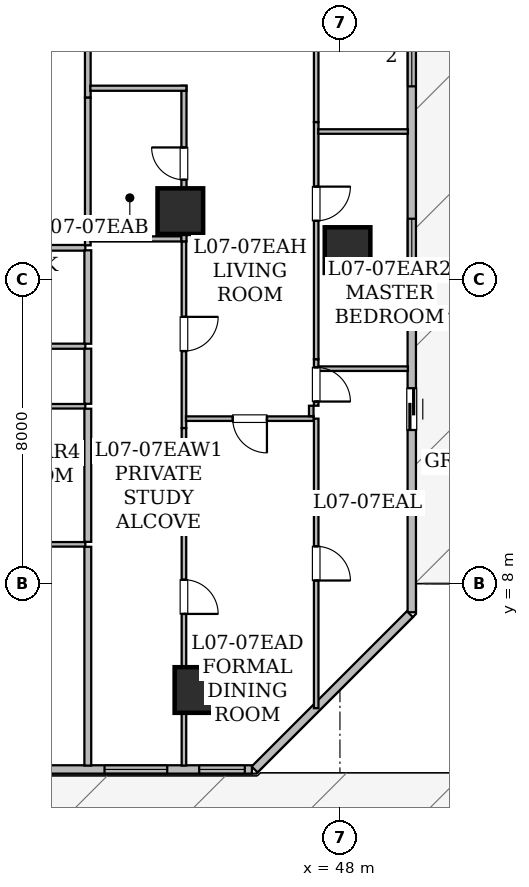
"""IFC4 building model, lengths in metres.
Left out: names, types, materials, properties, quantities, classifications, styles, units other than length and angle.
Written with IfcOpenShell. Run it as: python <this file> out.ifc"""

import sys

from ifc_helpers import new_model, si_unit, direction, frame, frame_2d, origin, origin_2d, place, context, subcontext, project, spatial, rectangle, hollow_rectangle, extrude, element, fill, save


model = new_model("IFC4")
c1 = context("Model", 3, precision=1e-05, world=origin(), true_north=direction((0.0, 1.0)))
c2 = subcontext(c1, "Body", "Model", "MODEL_VIEW")
j1 = project(units=[si_unit("LENGTHUNIT", "METRE"), si_unit("PLANEANGLEUNIT", "RADIAN")], contexts=[c1])
p1 = place(None, origin())
s1 = spatial("IfcSite", under=j1, at=p1, CompositionType="ELEMENT")
p2 = place(p1, origin())
s2 = spatial("IfcBuilding", under=s1, at=p2, CompositionType="ELEMENT")
p3 = place(p2, frame((0.0, 0.0, 33.3)))
s3 = spatial("IfcBuildingStorey", under=s2, at=p3, CompositionType="ELEMENT", Elevation=33.3)
for number, where, z_axis, x_axis in (
    (1, (44.25, 5.2, 0.025), (0.0, 0.0, 1.0), (1.0, 0.0, 0.0)),
    (2, (48.2, 16.775, 0.025), (0.0, 0.0, 1.0), (1.0, 0.0, 0.0)),
    (3, (43.8, 17.8, 0.025), (0.0, 0.0, 1.0), (1.0, 0.0, 0.0)),
):
    element("IfcColumn", number, at=place(p3, frame(where, z_axis=z_axis, x_axis=x_axis)), inside=s3, PredefinedType="COLUMN", context=c2, shape_type="SweptSolid", body=[
        extrude(hollow_rectangle(XDim=1.2, YDim=1.2, WallThickness=0.06, at=origin_2d()), origin(), (0.0, 0.0, 1.0), 3.625),
    ])
p4 = place(p3, frame((49.89, 24.707, 0.0), z_axis=(0.0, 0.0, 1.0), x_axis=(0.0, -1.0, 0.0)))
e4 = element("IfcWall", 4, at=p4, inside=s3, PredefinedType="STANDARD", context=c2, shape_type="SweptSolid", body=[
    extrude(rectangle(XDim=17.461, YDim=0.22, at=frame_2d((8.73, 0.0))), origin(), (0.0, 0.0, 1.0), 3.43),
])
p5 = place(p4, frame((11.566, 0.0, 0.0)))
e5 = element("IfcOpeningElement", 5, at=p5, cuts=e4, PredefinedType="OPENING", context=c2, shape_type="SweptSolid", body=[
    extrude(rectangle(XDim=1.1, YDim=2.2, at=frame_2d((0.55, 1.1))), frame((0.0, 0.12, 0.0), z_axis=(0.0, -1.0, 0.0), x_axis=(1.0, 0.0, 0.0)), (0.0, 0.0, 1.0), 0.24),
])
p6 = place(p4, frame((7.107, 0.0, 0.85)))
e6 = element("IfcOpeningElement", 6, at=p6, cuts=e4, PredefinedType="OPENING", context=c2, shape_type="SweptSolid", body=[
    extrude(rectangle(XDim=1.65, YDim=1.55, at=frame_2d((0.825, 0.775))), frame((0.0, 0.12, 0.0), z_axis=(0.0, -1.0, 0.0), x_axis=(1.0, 0.0, 0.0)), (0.0, 0.0, 1.0), 0.24),
])
p7 = place(p4, frame((1.973, 0.0, 0.85)))
e7 = element("IfcOpeningElement", 7, at=p7, cuts=e4, PredefinedType="OPENING", context=c2, shape_type="SweptSolid", body=[
    extrude(rectangle(XDim=1.65, YDim=1.55, at=frame_2d((0.825, 0.775))), frame((0.0, 0.12, 0.0), z_axis=(0.0, -1.0, 0.0), x_axis=(1.0, 0.0, 0.0)), (0.0, 0.0, 1.0), 0.24),
])
p8 = place(p3, frame((49.84, 7.196, 0.0), z_axis=(0.0, 0.0, 1.0), x_axis=(-0.707127905562, -0.70708565618, 0.0)))
e8 = element("IfcWall", 8, at=p8, inside=s3, PredefinedType="STANDARD", context=c2, shape_type="SweptSolid", body=[
    extrude(rectangle(XDim=5.779, YDim=0.22, at=frame_2d((2.889, 0.0))), origin(), (0.0, 0.0, 1.0), 3.43),
])
p9 = place(p3, frame((45.683, 3.11, 0.0), z_axis=(0.0, 0.0, 1.0), x_axis=(-1.0, 0.0, 0.0)))
e9 = element("IfcWall", 9, at=p9, inside=s3, PredefinedType="STANDARD", context=c2, shape_type="SweptSolid", body=[
    extrude(rectangle(XDim=37.368, YDim=0.22, at=frame_2d((18.684, 0.0))), origin(), (0.0, 0.0, 1.0), 3.43),
])
p10 = place(p9, frame((5.728, 0.0, 0.0)))
e10 = element("IfcOpeningElement", 10, at=p10, cuts=e9, PredefinedType="OPENING", context=c2, shape_type="SweptSolid", body=[
    extrude(rectangle(XDim=1.0, YDim=2.15, at=frame_2d((0.5, 1.075))), frame((0.0, 0.12, 0.0), z_axis=(0.0, -1.0, 0.0), x_axis=(1.0, 0.0, 0.0)), (0.0, 0.0, 1.0), 0.24),
])
p11 = place(p9, frame((31.194, 0.0, 0.85)))
e11 = element("IfcOpeningElement", 11, at=p11, cuts=e9, PredefinedType="OPENING", context=c2, shape_type="SweptSolid", body=[
    extrude(rectangle(XDim=1.65, YDim=1.55, at=frame_2d((0.825, 0.775))), frame((0.0, 0.12, 0.0), z_axis=(0.0, -1.0, 0.0), x_axis=(1.0, 0.0, 0.0)), (0.0, 0.0, 1.0), 0.24),
])
p12 = place(p9, frame((23.492, 0.0, 0.8)))
e12 = element("IfcOpeningElement", 12, at=p12, cuts=e9, PredefinedType="OPENING", context=c2, shape_type="SweptSolid", body=[
    extrude(rectangle(XDim=1.2, YDim=1.5, at=frame_2d((0.6, 0.75))), frame((0.0, 0.12, 0.0), z_axis=(0.0, -1.0, 0.0), x_axis=(1.0, 0.0, 0.0)), (0.0, 0.0, 1.0), 0.24),
])
p13 = place(p9, frame((26.282, 0.0, 0.85)))
e13 = element("IfcOpeningElement", 13, at=p13, cuts=e9, PredefinedType="OPENING", context=c2, shape_type="SweptSolid", body=[
    extrude(rectangle(XDim=1.65, YDim=1.55, at=frame_2d((0.825, 0.775))), frame((0.0, 0.12, 0.0), z_axis=(0.0, -1.0, 0.0), x_axis=(1.0, 0.0, 0.0)), (0.0, 0.0, 1.0), 0.24),
])
p14 = place(p9, frame((20.253, 0.0, 0.85)))
e14 = element("IfcOpeningElement", 14, at=p14, cuts=e9, PredefinedType="OPENING", context=c2, shape_type="SweptSolid", body=[
    extrude(rectangle(XDim=1.65, YDim=1.55, at=frame_2d((0.825, 0.775))), frame((0.0, 0.12, 0.0), z_axis=(0.0, -1.0, 0.0), x_axis=(1.0, 0.0, 0.0)), (0.0, 0.0, 1.0), 0.24),
])
p15 = place(p9, frame((10.983, 0.0, 0.8)))
e15 = element("IfcOpeningElement", 15, at=p15, cuts=e9, PredefinedType="OPENING", context=c2, shape_type="SweptSolid", body=[
    extrude(rectangle(XDim=1.2, YDim=1.5, at=frame_2d((0.6, 0.75))), frame((0.0, 0.12, 0.0), z_axis=(0.0, -1.0, 0.0), x_axis=(1.0, 0.0, 0.0)), (0.0, 0.0, 1.0), 0.24),
])
p16 = place(p9, frame((14.783, 0.0, 0.85)))
e16 = element("IfcOpeningElement", 16, at=p16, cuts=e9, PredefinedType="OPENING", context=c2, shape_type="SweptSolid", body=[
    extrude(rectangle(XDim=1.65, YDim=1.55, at=frame_2d((0.825, 0.775))), frame((0.0, 0.12, 0.0), z_axis=(0.0, -1.0, 0.0), x_axis=(1.0, 0.0, 0.0)), (0.0, 0.0, 1.0), 0.24),
])
p17 = place(p9, frame((2.228, 0.0, 0.85)))
e17 = element("IfcOpeningElement", 17, at=p17, cuts=e9, PredefinedType="OPENING", context=c2, shape_type="SweptSolid", body=[
    extrude(rectangle(XDim=1.65, YDim=1.55, at=frame_2d((0.825, 0.775))), frame((0.0, 0.12, 0.0), z_axis=(0.0, -1.0, 0.0), x_axis=(1.0, 0.0, 0.0)), (0.0, 0.0, 1.0), 0.24),
])
p18 = place(p9, frame((0.187, 0.0, 0.8)))
e18 = element("IfcOpeningElement", 18, at=p18, cuts=e9, PredefinedType="OPENING", context=c2, shape_type="SweptSolid", body=[
    extrude(rectangle(XDim=1.2, YDim=1.5, at=frame_2d((0.6, 0.75))), frame((0.0, 0.12, 0.0), z_axis=(0.0, -1.0, 0.0), x_axis=(1.0, 0.0, 0.0)), (0.0, 0.0, 1.0), 0.24),
])
p19 = place(p3, frame((41.3, 16.835, 0.0), z_axis=(0.0, 0.0, 1.0), x_axis=(-1.0, 0.0, 0.0)))
e19 = element("IfcWall", 19, at=p19, inside=s3, PredefinedType="STANDARD", context=c2, shape_type="SweptSolid", body=[
    extrude(rectangle(XDim=7.001, YDim=0.15, at=frame_2d((3.5, 0.0))), origin(), (0.0, 0.0, 1.0), 3.43),
])
p20 = place(p3, frame((41.365, 17.318, 0.0), z_axis=(0.0, 0.0, 1.0), x_axis=(0.0, -1.0, 0.0)))
e20 = element("IfcWall", 20, at=p20, inside=s3, PredefinedType="STANDARD", context=c2, shape_type="SweptSolid", body=[
    extrude(rectangle(XDim=0.418, YDim=0.15, at=frame_2d((0.209, 0.0))), origin(), (0.0, 0.0, 1.0), 3.43),
])
p21 = place(p3, frame((41.365, 23.483, 0.0), z_axis=(0.0, 0.0, 1.0), x_axis=(0.0, -1.0, 0.0)))
e21 = element("IfcWall", 21, at=p21, inside=s3, PredefinedType="STANDARD", context=c2, shape_type="SweptSolid", body=[
    extrude(rectangle(XDim=2.698, YDim=0.15, at=frame_2d((1.349, 0.0))), origin(), (0.0, 0.0, 1.0), 3.43),
])
p22 = place(p3, frame((41.365, 20.785, 0.0), z_axis=(0.0, 0.0, 1.0), x_axis=(0.0, -1.0, 0.0)))
e22 = element("IfcWall", 22, at=p22, inside=s3, PredefinedType="STANDARD", context=c2, shape_type="SweptSolid", body=[
    extrude(rectangle(XDim=3.467, YDim=0.15, at=frame_2d((1.733, 0.0))), origin(), (0.0, 0.0, 1.0), 2.647),
])
p23 = place(p3, frame((33.985, 14.246, 0.0), z_axis=(0.0, 0.0, 1.0), x_axis=(1.0, 0.0, 0.0)))
e23 = element("IfcWall", 23, at=p23, inside=s3, PredefinedType="PARTITIONING", context=c2, shape_type="SweptSolid", body=[
    extrude(rectangle(XDim=7.315, YDim=0.135, at=frame_2d((3.657, 0.0))), origin(), (0.0, 0.0, 1.0), 3.43),
])
p24 = place(p23, frame((3.233, 0.0, 0.0)))
e24 = element("IfcOpeningElement", 24, at=p24, cuts=e23, PredefinedType="OPENING", context=c2, shape_type="SweptSolid", body=[
    extrude(rectangle(XDim=0.85, YDim=2.1, at=frame_2d((0.425, 1.05))), frame((0.0, 0.077, 0.0), z_axis=(0.0, -1.0, 0.0), x_axis=(1.0, 0.0, 0.0)), (0.0, 0.0, 1.0), 0.155),
])
p25 = place(p3, frame((41.3, 12.666, 0.0), z_axis=(0.0, 0.0, 1.0), x_axis=(-1.0, 0.0, 0.0)))
e25 = element("IfcWall", 25, at=p25, inside=s3, PredefinedType="PARTITIONING", context=c2, shape_type="SweptSolid", body=[
    extrude(rectangle(XDim=6.48, YDim=0.12, at=frame_2d((3.24, 0.0))), origin(), (0.0, 0.0, 1.0), 3.43),
])
p26 = place(p25, frame((2.79, 0.0, 0.0)))
e26 = element("IfcOpeningElement", 26, at=p26, cuts=e25, PredefinedType="OPENING", context=c2, shape_type="SweptSolid", body=[
    extrude(rectangle(XDim=0.9, YDim=2.1, at=frame_2d((0.45, 1.05))), frame((0.0, 0.07, 0.0), z_axis=(0.0, -1.0, 0.0), x_axis=(1.0, 0.0, 0.0)), (0.0, 0.0, 1.0), 0.14),
])
p27 = place(p3, frame((41.365, 14.181, 0.0), z_axis=(0.0, 0.0, 1.0), x_axis=(0.0, -1.0, 0.0)))
e27 = element("IfcWall", 27, at=p27, inside=s3, PredefinedType="STANDARD", context=c2, shape_type="SweptSolid", body=[
    extrude(rectangle(XDim=1.45, YDim=0.18, at=frame_2d((0.725, 0.0))), origin(), (0.0, 0.0, 1.0), 3.43),
])
p28 = place(p3, frame((41.365, 16.77, 0.0), z_axis=(0.0, 0.0, 1.0), x_axis=(0.0, -1.0, 0.0)))
e28 = element("IfcWall", 28, at=p28, inside=s3, PredefinedType="STANDARD", context=c2, shape_type="SweptSolid", body=[
    extrude(rectangle(XDim=2.459, YDim=0.18, at=frame_2d((1.229, 0.0))), origin(), (0.0, 0.0, 1.0), 3.43),
])
p29 = place(p3, frame((34.939, 9.033, 0.0), z_axis=(0.0, 0.0, 1.0), x_axis=(1.0, 0.0, 0.0)))
e29 = element("IfcWall", 29, at=p29, inside=s3, PredefinedType="PARTITIONING", context=c2, shape_type="SweptSolid", body=[
    extrude(rectangle(XDim=6.361, YDim=0.12, at=frame_2d((3.181, 0.0))), origin(), (0.0, 0.0, 1.0), 3.43),
])
p30 = place(p3, frame((41.365, 8.968, 0.0), z_axis=(0.0, 0.0, 1.0), x_axis=(0.0, -1.0, 0.0)))
e30 = element("IfcWall", 30, at=p30, inside=s3, PredefinedType="STANDARD", context=c2, shape_type="SweptSolid", body=[
    extrude(rectangle(XDim=5.756, YDim=0.18, at=frame_2d((2.878, 0.0))), origin(), (0.0, 0.0, 1.0), 2.803),
])
p31 = place(p3, frame((41.365, 12.601, 0.0), z_axis=(0.0, 0.0, 1.0), x_axis=(0.0, -1.0, 0.0)))
e31 = element("IfcWall", 31, at=p31, inside=s3, PredefinedType="STANDARD", context=c2, shape_type="SweptSolid", body=[
    extrude(rectangle(XDim=3.503, YDim=0.18, at=frame_2d((1.751, 0.0))), origin(), (0.0, 0.0, 1.0), 3.43),
])
p32 = place(p3, frame((43.895, 17.004, 0.0), z_axis=(0.0, 0.0, 1.0), x_axis=(0.0, -1.0, 0.0)))
e32 = element("IfcWall", 32, at=p32, inside=s3, PredefinedType="PARTITIONING", context=c2, shape_type="SweptSolid", body=[
    extrude(rectangle(XDim=4.913, YDim=0.12, at=frame_2d((2.457, 0.0))), origin(), (0.0, 0.0, 1.0), 2.647),
])
p33 = place(p32, frame((1.986, 0.0, 0.0)))
e33 = element("IfcOpeningElement", 33, at=p33, cuts=e32, PredefinedType="OPENING", context=c2, shape_type="SweptSolid", body=[
    extrude(rectangle(XDim=0.9, YDim=2.1, at=frame_2d((0.45, 1.05))), frame((0.0, 0.07, 0.0), z_axis=(0.0, -1.0, 0.0), x_axis=(1.0, 0.0, 0.0)), (0.0, 0.0, 1.0), 0.14),
])
p34 = place(p3, frame((43.895, 12.091, 0.0), z_axis=(0.0, 0.0, 1.0), x_axis=(0.0, -1.0, 0.0)))
e34 = element("IfcWall", 34, at=p34, inside=s3, PredefinedType="PARTITIONING", context=c2, shape_type="SweptSolid", body=[
    extrude(rectangle(XDim=8.879, YDim=0.12, at=frame_2d((4.439, 0.0))), origin(), (0.0, 0.0, 1.0), 2.647),
])
p35 = place(p34, frame((3.989, 0.0, 0.0)))
e35 = element("IfcOpeningElement", 35, at=p35, cuts=e34, PredefinedType="OPENING", context=c2, shape_type="SweptSolid", body=[
    extrude(rectangle(XDim=0.9, YDim=2.1, at=frame_2d((0.45, 1.05))), frame((0.0, 0.07, 0.0), z_axis=(0.0, -1.0, 0.0), x_axis=(1.0, 0.0, 0.0)), (0.0, 0.0, 1.0), 0.14),
])
p36 = place(p3, frame((41.432, 17.069, 0.0), z_axis=(0.0, 0.0, 1.0), x_axis=(1.0, 0.0, 0.0)))
e36 = element("IfcWall", 36, at=p36, inside=s3, PredefinedType="PARTITIONING", context=c2, shape_type="SweptSolid", body=[
    extrude(rectangle(XDim=2.398, YDim=0.135, at=frame_2d((1.199, 0.0))), origin(), (0.0, 0.0, 1.0), 2.647),
])
p37 = place(p3, frame((47.31, 12.34, 0.0), z_axis=(0.0, 0.0, 1.0), x_axis=(-1.0, 0.0, 0.0)))
e37 = element("IfcWall", 37, at=p37, inside=s3, PredefinedType="PARTITIONING", context=c2, shape_type="SweptSolid", body=[
    extrude(rectangle(XDim=3.361, YDim=0.12, at=frame_2d((1.681, 0.0))), origin(), (0.0, 0.0, 1.0), 2.647),
])
p38 = place(p37, frame((1.231, 0.0, 0.0)))
e38 = element("IfcOpeningElement", 38, at=p38, cuts=e37, PredefinedType="OPENING", context=c2, shape_type="SweptSolid", body=[
    extrude(rectangle(XDim=0.9, YDim=2.1, at=frame_2d((0.45, 1.05))), frame((0.0, 0.07, 0.0), z_axis=(0.0, -1.0, 0.0), x_axis=(1.0, 0.0, 0.0)), (0.0, 0.0, 1.0), 0.14),
])
p39 = place(p3, frame((47.245, 12.68, 0.0), z_axis=(0.0, 0.0, 1.0), x_axis=(0.0, -1.0, 0.0)))
e39 = element("IfcWall", 39, at=p39, inside=s3, PredefinedType="PARTITIONING", context=c2, shape_type="SweptSolid", body=[
    extrude(rectangle(XDim=0.275, YDim=0.12, at=frame_2d((0.137, 0.0))), origin(), (0.0, 0.0, 1.0), 3.43),
])
p40 = place(p3, frame((43.895, 17.004, 0.0), z_axis=(0.0, 0.0, 1.0), x_axis=(0.0, 1.0, 0.0)))
e40 = element("IfcWall", 40, at=p40, inside=s3, PredefinedType="PARTITIONING", context=c2, shape_type="SweptSolid", body=[
    extrude(rectangle(XDim=4.095, YDim=0.135, at=frame_2d((2.048, 0.0))), origin(), (0.0, 0.0, 1.0), 2.647),
])
p41 = place(p40, frame((1.622, 0.0, 0.0)))
e41 = element("IfcOpeningElement", 41, at=p41, cuts=e40, PredefinedType="OPENING", context=c2, shape_type="SweptSolid", body=[
    extrude(rectangle(XDim=0.85, YDim=2.1, at=frame_2d((0.425, 1.05))), frame((0.0, 0.077, 0.0), z_axis=(0.0, -1.0, 0.0), x_axis=(1.0, 0.0, 0.0)), (0.0, 0.0, 1.0), 0.155),
])
p42 = place(p3, frame((43.96, 21.034, 0.0), z_axis=(0.0, 0.0, 1.0), x_axis=(-1.0, 0.0, 0.0)))
e42 = element("IfcWall", 42, at=p42, inside=s3, PredefinedType="PARTITIONING", context=c2, shape_type="SweptSolid", body=[
    extrude(rectangle(XDim=2.528, YDim=0.135, at=frame_2d((1.264, 0.0))), origin(), (0.0, 0.0, 1.0), 2.647),
])
p43 = place(p3, frame((47.375, 13.904, 0.0), z_axis=(0.0, 0.0, 1.0), x_axis=(0.0, -1.0, 0.0)))
e43 = element("IfcWall", 43, at=p43, inside=s3, PredefinedType="PARTITIONING", context=c2, shape_type="SweptSolid", body=[
    extrude(rectangle(XDim=1.224, YDim=0.12, at=frame_2d((0.612, 0.0))), origin(), (0.0, 0.0, 1.0), 2.803),
])
p44 = place(p43, frame((0.214, 0.0, 0.0)))
e44 = element("IfcOpeningElement", 44, at=p44, cuts=e43, PredefinedType="OPENING", context=c2, shape_type="SweptSolid", body=[
    extrude(rectangle(XDim=0.9, YDim=2.1, at=frame_2d((0.45, 1.05))), frame((0.0, 0.07, 0.0), z_axis=(0.0, -1.0, 0.0), x_axis=(1.0, 0.0, 0.0)), (0.0, 0.0, 1.0), 0.14),
])
p45 = place(p3, frame((47.375, 20.144, 0.0), z_axis=(0.0, 0.0, 1.0), x_axis=(0.0, -1.0, 0.0)))
e45 = element("IfcWall", 45, at=p45, inside=s3, PredefinedType="PARTITIONING", context=c2, shape_type="SweptSolid", body=[
    extrude(rectangle(XDim=6.24, YDim=0.12, at=frame_2d((3.12, 0.0))), origin(), (0.0, 0.0, 1.0), 2.647),
])
p46 = place(p45, frame((1.699, 0.0, 0.0)))
e46 = element("IfcOpeningElement", 46, at=p46, cuts=e45, PredefinedType="OPENING", context=c2, shape_type="SweptSolid", body=[
    extrude(rectangle(XDim=0.9, YDim=2.1, at=frame_2d((0.45, 1.05))), frame((0.0, 0.07, 0.0), z_axis=(0.0, -1.0, 0.0), x_axis=(1.0, 0.0, 0.0)), (0.0, 0.0, 1.0), 0.14),
])
p47 = place(p3, frame((47.375, 30.17, 0.0), z_axis=(0.0, 0.0, 1.0), x_axis=(0.0, -1.0, 0.0)))
e47 = element("IfcWall", 47, at=p47, inside=s3, PredefinedType="PARTITIONING", context=c2, shape_type="SweptSolid", body=[
    extrude(rectangle(XDim=10.026, YDim=0.12, at=frame_2d((5.013, 0.0))), origin(), (0.0, 0.0, 1.0), 2.957),
])
p48 = place(p47, frame((5.727, 0.0, 0.0)))
e48 = element("IfcOpeningElement", 48, at=p48, cuts=e47, PredefinedType="OPENING", context=c2, shape_type="SweptSolid", body=[
    extrude(rectangle(XDim=0.9, YDim=2.1, at=frame_2d((0.45, 1.05))), frame((0.0, 0.07, 0.0), z_axis=(0.0, -1.0, 0.0), x_axis=(1.0, 0.0, 0.0)), (0.0, 0.0, 1.0), 0.14),
])
p49 = place(p3, frame((47.375, 12.34, 0.0), z_axis=(0.0, 0.0, 1.0), x_axis=(0.0, -1.0, 0.0)))
e49 = element("IfcWall", 49, at=p49, inside=s3, PredefinedType="PARTITIONING", context=c2, shape_type="SweptSolid", body=[
    extrude(rectangle(XDim=7.618, YDim=0.12, at=frame_2d((3.809, 0.0))), origin(), (0.0, 0.0, 1.0), 3.43),
])
p50 = place(p49, frame((3.359, 0.0, 0.0)))
e50 = element("IfcOpeningElement", 50, at=p50, cuts=e49, PredefinedType="OPENING", context=c2, shape_type="SweptSolid", body=[
    extrude(rectangle(XDim=0.9, YDim=2.1, at=frame_2d((0.45, 1.05))), frame((0.0, 0.07, 0.0), z_axis=(0.0, -1.0, 0.0), x_axis=(1.0, 0.0, 0.0)), (0.0, 0.0, 1.0), 0.14),
])
p51 = place(p3, frame((47.429, 13.655, 0.0), z_axis=(0.0, 0.0, 1.0), x_axis=(1.0, 0.0, 0.0)))
e51 = element("IfcWall", 51, at=p51, inside=s3, PredefinedType="PARTITIONING", context=c2, shape_type="SweptSolid", body=[
    extrude(rectangle(XDim=2.359, YDim=0.12, at=frame_2d((1.18, 0.0))), origin(), (0.0, 0.0, 1.0), 3.43),
])
p52 = place(p3, frame((47.429, 19.895, 0.0), z_axis=(0.0, 0.0, 1.0), x_axis=(1.0, 0.0, 0.0)))
e52 = element("IfcWall", 52, at=p52, inside=s3, PredefinedType="PARTITIONING", context=c2, shape_type="SweptSolid", body=[
    extrude(rectangle(XDim=2.359, YDim=0.12, at=frame_2d((1.18, 0.0))), origin(), (0.0, 0.0, 1.0), 2.803),
])
p53 = place(p5, origin())
e53 = element("IfcDoor", 53, at=p53, inside=s3, OperationType="SLIDING_TO_LEFT", PredefinedType="DOOR", context=c2, shape_type="SweptSolid", body=[
    extrude(rectangle(XDim=1.1, YDim=2.2, at=frame_2d((0.55, 1.1))), frame((0.0, 0.025, 0.0), z_axis=(0.0, -1.0, 0.0), x_axis=(1.0, 0.0, 0.0)), (0.0, 0.0, 1.0), 0.05),
])
fill(e5, e53)
p54 = place(p17, origin())
e54 = element("IfcWindow", 54, at=p54, inside=s3, PartitioningType="SINGLE_PANEL", PredefinedType="WINDOW", context=c2, shape_type="SweptSolid", body=[
    extrude(rectangle(XDim=1.65, YDim=1.55, at=frame_2d((0.825, 0.775))), frame((0.0, 0.03, 0.0), z_axis=(0.0, -1.0, 0.0), x_axis=(1.0, 0.0, 0.0)), (0.0, 0.0, 1.0), 0.06),
])
fill(e17, e54)
p55 = place(p18, origin())
e55 = element("IfcWindow", 55, at=p55, inside=s3, PartitioningType="SINGLE_PANEL", PredefinedType="WINDOW", context=c2, shape_type="SweptSolid", body=[
    extrude(rectangle(XDim=1.2, YDim=1.5, at=frame_2d((0.6, 0.75))), frame((0.0, 0.03, 0.0), z_axis=(0.0, -1.0, 0.0), x_axis=(1.0, 0.0, 0.0)), (0.0, 0.0, 1.0), 0.06),
])
fill(e18, e55)
p56 = place(p6, origin())
e56 = element("IfcWindow", 56, at=p56, inside=s3, PartitioningType="SINGLE_PANEL", PredefinedType="WINDOW", context=c2, shape_type="SweptSolid", body=[
    extrude(rectangle(XDim=1.65, YDim=1.55, at=frame_2d((0.825, 0.775))), frame((0.0, 0.03, 0.0), z_axis=(0.0, -1.0, 0.0), x_axis=(1.0, 0.0, 0.0)), (0.0, 0.0, 1.0), 0.06),
])
fill(e6, e56)
p57 = place(p7, origin())
e57 = element("IfcWindow", 57, at=p57, inside=s3, PartitioningType="SINGLE_PANEL", PredefinedType="WINDOW", context=c2, shape_type="SweptSolid", body=[
    extrude(rectangle(XDim=1.65, YDim=1.55, at=frame_2d((0.825, 0.775))), frame((0.0, 0.03, 0.0), z_axis=(0.0, -1.0, 0.0), x_axis=(1.0, 0.0, 0.0)), (0.0, 0.0, 1.0), 0.06),
])
fill(e7, e57)
p58 = place(p33, origin())
e58 = element("IfcDoor", 58, at=p58, inside=s3, OperationType="SINGLE_SWING_LEFT", PredefinedType="DOOR", context=c2, shape_type="SweptSolid", body=[
    extrude(rectangle(XDim=0.9, YDim=2.1, at=frame_2d((0.45, 1.05))), frame((0.0, 0.025, 0.0), z_axis=(0.0, -1.0, 0.0), x_axis=(1.0, 0.0, 0.0)), (0.0, 0.0, 1.0), 0.05),
])
fill(e33, e58)
p59 = place(p35, origin())
e59 = element("IfcDoor", 59, at=p59, inside=s3, OperationType="SINGLE_SWING_RIGHT", PredefinedType="DOOR", context=c2, shape_type="SweptSolid", body=[
    extrude(rectangle(XDim=0.9, YDim=2.1, at=frame_2d((0.45, 1.05))), frame((0.0, 0.025, 0.0), z_axis=(0.0, -1.0, 0.0), x_axis=(1.0, 0.0, 0.0)), (0.0, 0.0, 1.0), 0.05),
])
fill(e35, e59)
p60 = place(p38, origin())
e60 = element("IfcDoor", 60, at=p60, inside=s3, OperationType="SINGLE_SWING_LEFT", PredefinedType="DOOR", context=c2, shape_type="SweptSolid", body=[
    extrude(rectangle(XDim=0.9, YDim=2.1, at=frame_2d((0.45, 1.05))), frame((0.0, 0.025, 0.0), z_axis=(0.0, -1.0, 0.0), x_axis=(1.0, 0.0, 0.0)), (0.0, 0.0, 1.0), 0.05),
])
fill(e38, e60)
p61 = place(p41, origin())
e61 = element("IfcDoor", 61, at=p61, inside=s3, OperationType="SINGLE_SWING_RIGHT", PredefinedType="DOOR", context=c2, shape_type="SweptSolid", body=[
    extrude(rectangle(XDim=0.85, YDim=2.1, at=frame_2d((0.425, 1.05))), frame((0.0, 0.025, 0.0), z_axis=(0.0, -1.0, 0.0), x_axis=(1.0, 0.0, 0.0)), (0.0, 0.0, 1.0), 0.05),
])
fill(e41, e61)
p62 = place(p44, origin())
e62 = element("IfcDoor", 62, at=p62, inside=s3, OperationType="SINGLE_SWING_RIGHT", PredefinedType="DOOR", context=c2, shape_type="SweptSolid", body=[
    extrude(rectangle(XDim=0.9, YDim=2.1, at=frame_2d((0.45, 1.05))), frame((0.0, 0.025, 0.0), z_axis=(0.0, -1.0, 0.0), x_axis=(1.0, 0.0, 0.0)), (0.0, 0.0, 1.0), 0.05),
])
fill(e44, e62)
p63 = place(p46, origin())
e63 = element("IfcDoor", 63, at=p63, inside=s3, OperationType="SINGLE_SWING_LEFT", PredefinedType="DOOR", context=c2, shape_type="SweptSolid", body=[
    extrude(rectangle(XDim=0.9, YDim=2.1, at=frame_2d((0.45, 1.05))), frame((0.0, 0.025, 0.0), z_axis=(0.0, -1.0, 0.0), x_axis=(1.0, 0.0, 0.0)), (0.0, 0.0, 1.0), 0.05),
])
fill(e46, e63)
p64 = place(p50, origin())
e64 = element("IfcDoor", 64, at=p64, inside=s3, OperationType="SINGLE_SWING_RIGHT", PredefinedType="DOOR", context=c2, shape_type="SweptSolid", body=[
    extrude(rectangle(XDim=0.9, YDim=2.1, at=frame_2d((0.45, 1.05))), frame((0.0, 0.025, 0.0), z_axis=(0.0, -1.0, 0.0), x_axis=(1.0, 0.0, 0.0)), (0.0, 0.0, 1.0), 0.05),
])
fill(e50, e64)
save(model, sys.argv[1])
